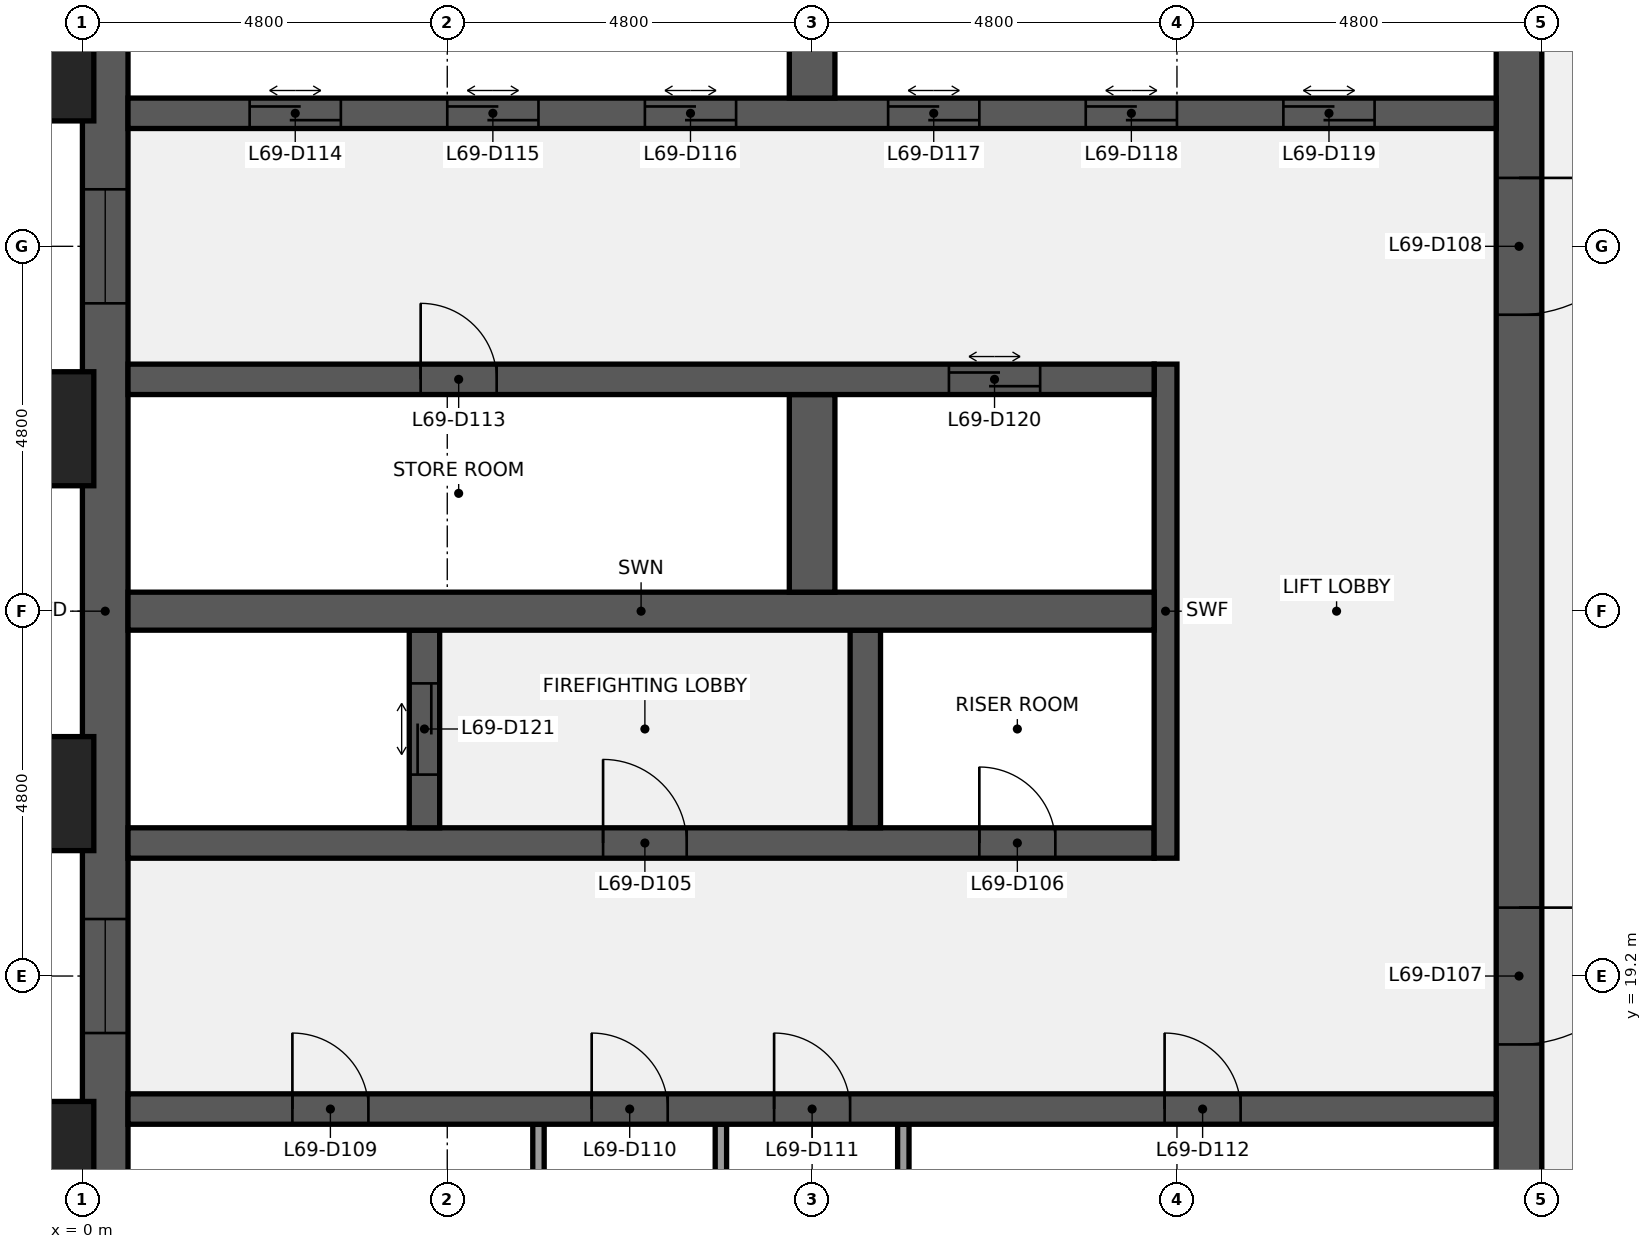
"""IFC4 building model, lengths in metres.
Left out: names, types, materials, properties, quantities, classifications, styles, units other than length and angle.
Written with IfcOpenShell. Run it as: python <this file> out.ifc"""

import sys

from ifc_helpers import new_model, si_unit, direction, frame, frame_2d, origin, origin_2d, place, context, subcontext, project, spatial, rectangle, extrude, element, fill, save


model = new_model("IFC4")
c1 = context("Model", 3, precision=1e-05, world=origin(), true_north=direction((0.0, 1.0)))
c2 = subcontext(c1, "Body", "Model", "MODEL_VIEW")
j1 = project(units=[si_unit("LENGTHUNIT", "METRE"), si_unit("PLANEANGLEUNIT", "RADIAN")], contexts=[c1])
p1 = place(None, origin())
s1 = spatial("IfcSite", under=j1, at=p1, CompositionType="ELEMENT")
p2 = place(p1, origin())
s2 = spatial("IfcBuilding", under=s1, at=p2, CompositionType="ELEMENT")
p3 = place(p2, frame((0.0, 0.0, 314.3)))
s3 = spatial("IfcBuildingStorey", under=s2, at=p3, CompositionType="ELEMENT", Elevation=314.3)
p4 = place(p3, frame((0.3, 9.6, 0.0), z_axis=(0.0, 0.0, 1.0), x_axis=(0.0, 1.0, 0.0)))
e1 = element("IfcWall", 1, at=p4, inside=s3, PredefinedType="SHEAR", context=c2, shape_type="SweptSolid", body=[
    extrude(rectangle(XDim=28.8, YDim=0.6, at=frame_2d((14.4, 0.0))), origin(), (0.0, 0.0, 1.0), 3.84),
])
p5 = place(p4, frame((8.85, 0.0, 0.9)))
e2 = element("IfcOpeningElement", 2, at=p5, cuts=e1, PredefinedType="OPENING", context=c2, shape_type="SweptSolid", body=[
    extrude(rectangle(XDim=1.5, YDim=1.5, at=frame_2d((0.75, 0.75))), frame((0.0, 0.31, 0.0), z_axis=(0.0, -1.0, 0.0), x_axis=(1.0, 0.0, 0.0)), (0.0, 0.0, 1.0), 0.62),
])
p6 = place(p4, frame((18.45, 0.0, 0.9)))
e3 = element("IfcOpeningElement", 3, at=p6, cuts=e1, PredefinedType="OPENING", context=c2, shape_type="SweptSolid", body=[
    extrude(rectangle(XDim=1.5, YDim=1.5, at=frame_2d((0.75, 0.75))), frame((0.0, 0.31, 0.0), z_axis=(0.0, -1.0, 0.0), x_axis=(1.0, 0.0, 0.0)), (0.0, 0.0, 1.0), 0.62),
])
p7 = place(p3, frame((18.9, 38.4, 0.0), z_axis=(0.0, 0.0, 1.0), x_axis=(0.0, -1.0, 0.0)))
e4 = element("IfcWall", 4, at=p7, inside=s3, PredefinedType="SHEAR", context=c2, shape_type="SweptSolid", body=[
    extrude(rectangle(XDim=28.8, YDim=0.6, at=frame_2d((14.4, 0.0))), origin(), (0.0, 0.0, 1.0), 3.84),
])
p8 = place(p7, frame((18.3, 0.0, 0.0)))
e5 = element("IfcOpeningElement", 5, at=p8, cuts=e4, PredefinedType="OPENING", context=c2, shape_type="SweptSolid", body=[
    extrude(rectangle(XDim=1.8, YDim=2.1, at=frame_2d((0.9, 1.05))), frame((0.0, 0.31, 0.0), z_axis=(0.0, -1.0, 0.0), x_axis=(1.0, 0.0, 0.0)), (0.0, 0.0, 1.0), 0.62),
])
p9 = place(p7, frame((8.7, 0.0, 0.0)))
e6 = element("IfcOpeningElement", 6, at=p9, cuts=e4, PredefinedType="OPENING", context=c2, shape_type="SweptSolid", body=[
    extrude(rectangle(XDim=1.8, YDim=2.1, at=frame_2d((0.9, 1.05))), frame((0.0, 0.31, 0.0), z_axis=(0.0, -1.0, 0.0), x_axis=(1.0, 0.0, 0.0)), (0.0, 0.0, 1.0), 0.62),
])
for number, where, z_axis, x_axis in (
    (7, (6.0, 14.65, 0.0), (0.0, 0.0, 1.0), (0.0, 1.0, 0.0)),
    (8, (8.4, 14.65, 0.0), (0.0, 0.0, 1.0), (0.0, 1.0, 0.0)),
    (9, (10.8, 14.65, 0.0), (0.0, 0.0, 1.0), (0.0, 1.0, 0.0)),
):
    element("IfcWall", number, at=place(p3, frame(where, z_axis=z_axis, x_axis=x_axis)), inside=s3, PredefinedType="PARTITIONING", context=c2, shape_type="SweptSolid", body=[
        extrude(rectangle(XDim=2.6, YDim=0.15, at=frame_2d((1.3, 0.0))), origin(), (0.0, 0.0, 1.0), 3.84),
    ])
p10 = place(p3, frame((0.6, 17.45, 0.0), z_axis=(0.0, 0.0, 1.0), x_axis=(1.0, 0.0, 0.0)))
e10 = element("IfcWall", 10, at=p10, inside=s3, PredefinedType="SHEAR", context=c2, shape_type="SweptSolid", body=[
    extrude(rectangle(XDim=18.0, YDim=0.4, at=frame_2d((9.0, 0.0))), origin(), (0.0, 0.0, 1.0), 3.84),
])
p11 = place(p10, frame((2.163, 0.0, 0.0)))
e11 = element("IfcOpeningElement", 11, at=p11, cuts=e10, PredefinedType="OPENING", context=c2, shape_type="SweptSolid", body=[
    extrude(rectangle(XDim=1.0, YDim=2.1, at=frame_2d((0.5, 1.05))), frame((0.0, 0.21, 0.0), z_axis=(0.0, -1.0, 0.0), x_axis=(1.0, 0.0, 0.0)), (0.0, 0.0, 1.0), 0.42),
])
p12 = place(p10, frame((6.1, 0.0, 0.0)))
e12 = element("IfcOpeningElement", 12, at=p12, cuts=e10, PredefinedType="OPENING", context=c2, shape_type="SweptSolid", body=[
    extrude(rectangle(XDim=1.0, YDim=2.1, at=frame_2d((0.5, 1.05))), frame((0.0, 0.21, 0.0), z_axis=(0.0, -1.0, 0.0), x_axis=(1.0, 0.0, 0.0)), (0.0, 0.0, 1.0), 0.42),
])
p13 = place(p10, frame((8.5, 0.0, 0.0)))
e13 = element("IfcOpeningElement", 13, at=p13, cuts=e10, PredefinedType="OPENING", context=c2, shape_type="SweptSolid", body=[
    extrude(rectangle(XDim=1.0, YDim=2.1, at=frame_2d((0.5, 1.05))), frame((0.0, 0.21, 0.0), z_axis=(0.0, -1.0, 0.0), x_axis=(1.0, 0.0, 0.0)), (0.0, 0.0, 1.0), 0.42),
])
p14 = place(p10, frame((13.637, 0.0, 0.0)))
e14 = element("IfcOpeningElement", 14, at=p14, cuts=e10, PredefinedType="OPENING", context=c2, shape_type="SweptSolid", body=[
    extrude(rectangle(XDim=1.0, YDim=2.1, at=frame_2d((0.5, 1.05))), frame((0.0, 0.21, 0.0), z_axis=(0.0, -1.0, 0.0), x_axis=(1.0, 0.0, 0.0)), (0.0, 0.0, 1.0), 0.42),
])
p15 = place(p3, frame((0.6, 20.95, 0.0), z_axis=(0.0, 0.0, 1.0), x_axis=(1.0, 0.0, 0.0)))
e15 = element("IfcWall", 15, at=p15, inside=s3, PredefinedType="SHEAR", context=c2, shape_type="SweptSolid", body=[
    extrude(rectangle(XDim=13.5, YDim=0.4, at=frame_2d((6.75, 0.0))), origin(), (0.0, 0.0, 1.0), 3.84),
])
p16 = place(p15, frame((6.25, 0.0, 0.0)))
e16 = element("IfcOpeningElement", 16, at=p16, cuts=e15, PredefinedType="OPENING", context=c2, shape_type="SweptSolid", body=[
    extrude(rectangle(XDim=1.1, YDim=2.1, at=frame_2d((0.55, 1.05))), frame((0.0, 0.21, 0.0), z_axis=(0.0, -1.0, 0.0), x_axis=(1.0, 0.0, 0.0)), (0.0, 0.0, 1.0), 0.42),
])
p17 = place(p15, frame((11.2, 0.0, 0.0)))
e17 = element("IfcOpeningElement", 17, at=p17, cuts=e15, PredefinedType="OPENING", context=c2, shape_type="SweptSolid", body=[
    extrude(rectangle(XDim=1.0, YDim=2.1, at=frame_2d((0.5, 1.05))), frame((0.0, 0.21, 0.0), z_axis=(0.0, -1.0, 0.0), x_axis=(1.0, 0.0, 0.0)), (0.0, 0.0, 1.0), 0.42),
])
p18 = place(p3, frame((14.25, 20.75, 0.0), z_axis=(0.0, 0.0, 1.0), x_axis=(0.0, 1.0, 0.0)))
e18 = element("IfcWall", 18, at=p18, inside=s3, PredefinedType="SHEAR", context=c2, shape_type="SweptSolid", body=[
    extrude(rectangle(XDim=6.5, YDim=0.3, at=frame_2d((3.25, 0.0))), origin(), (0.0, 0.0, 1.0), 3.84),
])
p19 = place(p3, frame((4.5, 21.15, 0.0), z_axis=(0.0, 0.0, 1.0), x_axis=(0.0, 1.0, 0.0)))
e19 = element("IfcWall", 19, at=p19, inside=s3, PredefinedType="SHEAR", context=c2, shape_type="SweptSolid", body=[
    extrude(rectangle(XDim=2.6, YDim=0.4, at=frame_2d((1.3, 0.0))), origin(), (0.0, 0.0, 1.0), 3.84),
])
p20 = place(p19, frame((0.7, 0.0, 0.0)))
e20 = element("IfcOpeningElement", 20, at=p20, cuts=e19, PredefinedType="OPENING", context=c2, shape_type="SweptSolid", body=[
    extrude(rectangle(XDim=1.2, YDim=2.1, at=frame_2d((0.6, 1.05))), frame((0.0, 0.21, 0.0), z_axis=(0.0, -1.0, 0.0), x_axis=(1.0, 0.0, 0.0)), (0.0, 0.0, 1.0), 0.42),
])
p21 = place(p3, frame((10.3, 21.15, 0.0), z_axis=(0.0, 0.0, 1.0), x_axis=(0.0, 1.0, 0.0)))
e21 = element("IfcWall", 21, at=p21, inside=s3, PredefinedType="SHEAR", context=c2, shape_type="SweptSolid", body=[
    extrude(rectangle(XDim=2.6, YDim=0.4, at=frame_2d((1.3, 0.0))), origin(), (0.0, 0.0, 1.0), 3.84),
])
p22 = place(p3, frame((0.6, 24.0, 0.0), z_axis=(0.0, 0.0, 1.0), x_axis=(1.0, 0.0, 0.0)))
e22 = element("IfcWall", 22, at=p22, inside=s3, PredefinedType="SHEAR", context=c2, shape_type="SweptSolid", body=[
    extrude(rectangle(XDim=13.5, YDim=0.5, at=frame_2d((6.75, 0.0))), origin(), (0.0, 0.0, 1.0), 3.84),
])
p23 = place(p3, frame((9.6, 24.25, 0.0), z_axis=(0.0, 0.0, 1.0), x_axis=(0.0, 1.0, 0.0)))
e23 = element("IfcWall", 23, at=p23, inside=s3, PredefinedType="SHEAR", context=c2, shape_type="SweptSolid", body=[
    extrude(rectangle(XDim=2.6, YDim=0.6, at=frame_2d((1.3, 0.0))), origin(), (0.0, 0.0, 1.0), 3.84),
])
p24 = place(p3, frame((0.6, 27.05, 0.0), z_axis=(0.0, 0.0, 1.0), x_axis=(1.0, 0.0, 0.0)))
e24 = element("IfcWall", 24, at=p24, inside=s3, PredefinedType="SHEAR", context=c2, shape_type="SweptSolid", body=[
    extrude(rectangle(XDim=13.5, YDim=0.4, at=frame_2d((6.75, 0.0))), origin(), (0.0, 0.0, 1.0), 3.84),
])
p25 = place(p24, frame((3.85, 0.0, 0.0)))
e25 = element("IfcOpeningElement", 25, at=p25, cuts=e24, PredefinedType="OPENING", context=c2, shape_type="SweptSolid", body=[
    extrude(rectangle(XDim=1.0, YDim=2.1, at=frame_2d((0.5, 1.05))), frame((0.0, 0.21, 0.0), z_axis=(0.0, -1.0, 0.0), x_axis=(1.0, 0.0, 0.0)), (0.0, 0.0, 1.0), 0.42),
])
p26 = place(p24, frame((10.8, 0.0, 0.0)))
e26 = element("IfcOpeningElement", 26, at=p26, cuts=e24, PredefinedType="OPENING", context=c2, shape_type="SweptSolid", body=[
    extrude(rectangle(XDim=1.2, YDim=2.1, at=frame_2d((0.6, 1.05))), frame((0.0, 0.21, 0.0), z_axis=(0.0, -1.0, 0.0), x_axis=(1.0, 0.0, 0.0)), (0.0, 0.0, 1.0), 0.42),
])
p27 = place(p3, frame((0.6, 30.55, 0.0), z_axis=(0.0, 0.0, 1.0), x_axis=(1.0, 0.0, 0.0)))
e27 = element("IfcWall", 27, at=p27, inside=s3, PredefinedType="SHEAR", context=c2, shape_type="SweptSolid", body=[
    extrude(rectangle(XDim=18.0, YDim=0.4, at=frame_2d((9.0, 0.0))), origin(), (0.0, 0.0, 1.0), 3.84),
])
p28 = place(p27, frame((1.6, 0.0, 0.0)))
e28 = element("IfcOpeningElement", 28, at=p28, cuts=e27, PredefinedType="OPENING", context=c2, shape_type="SweptSolid", body=[
    extrude(rectangle(XDim=1.2, YDim=2.1, at=frame_2d((0.6, 1.05))), frame((0.0, 0.21, 0.0), z_axis=(0.0, -1.0, 0.0), x_axis=(1.0, 0.0, 0.0)), (0.0, 0.0, 1.0), 0.42),
])
p29 = place(p27, frame((4.2, 0.0, 0.0)))
e29 = element("IfcOpeningElement", 29, at=p29, cuts=e27, PredefinedType="OPENING", context=c2, shape_type="SweptSolid", body=[
    extrude(rectangle(XDim=1.2, YDim=2.1, at=frame_2d((0.6, 1.05))), frame((0.0, 0.21, 0.0), z_axis=(0.0, -1.0, 0.0), x_axis=(1.0, 0.0, 0.0)), (0.0, 0.0, 1.0), 0.42),
])
p30 = place(p27, frame((6.8, 0.0, 0.0)))
e30 = element("IfcOpeningElement", 30, at=p30, cuts=e27, PredefinedType="OPENING", context=c2, shape_type="SweptSolid", body=[
    extrude(rectangle(XDim=1.2, YDim=2.1, at=frame_2d((0.6, 1.05))), frame((0.0, 0.21, 0.0), z_axis=(0.0, -1.0, 0.0), x_axis=(1.0, 0.0, 0.0)), (0.0, 0.0, 1.0), 0.42),
])
p31 = place(p27, frame((10.0, 0.0, 0.0)))
e31 = element("IfcOpeningElement", 31, at=p31, cuts=e27, PredefinedType="OPENING", context=c2, shape_type="SweptSolid", body=[
    extrude(rectangle(XDim=1.2, YDim=2.1, at=frame_2d((0.6, 1.05))), frame((0.0, 0.21, 0.0), z_axis=(0.0, -1.0, 0.0), x_axis=(1.0, 0.0, 0.0)), (0.0, 0.0, 1.0), 0.42),
])
p32 = place(p27, frame((12.6, 0.0, 0.0)))
e32 = element("IfcOpeningElement", 32, at=p32, cuts=e27, PredefinedType="OPENING", context=c2, shape_type="SweptSolid", body=[
    extrude(rectangle(XDim=1.2, YDim=2.1, at=frame_2d((0.6, 1.05))), frame((0.0, 0.21, 0.0), z_axis=(0.0, -1.0, 0.0), x_axis=(1.0, 0.0, 0.0)), (0.0, 0.0, 1.0), 0.42),
])
p33 = place(p27, frame((15.2, 0.0, 0.0)))
e33 = element("IfcOpeningElement", 33, at=p33, cuts=e27, PredefinedType="OPENING", context=c2, shape_type="SweptSolid", body=[
    extrude(rectangle(XDim=1.2, YDim=2.1, at=frame_2d((0.6, 1.05))), frame((0.0, 0.21, 0.0), z_axis=(0.0, -1.0, 0.0), x_axis=(1.0, 0.0, 0.0)), (0.0, 0.0, 1.0), 0.42),
])
p34 = place(p3, frame((9.6, 30.75, 0.0), z_axis=(0.0, 0.0, 1.0), x_axis=(0.0, 1.0, 0.0)))
e34 = element("IfcWall", 34, at=p34, inside=s3, PredefinedType="SHEAR", context=c2, shape_type="SweptSolid", body=[
    extrude(rectangle(XDim=2.6, YDim=0.6, at=frame_2d((1.3, 0.0))), origin(), (0.0, 0.0, 1.0), 3.84),
])
for number, where, z_axis, x_axis in (
    (35, (-0.75, 16.8, 0.0), (0.0, 0.0, 1.0), (0.0, 1.0, 0.0)),
    (36, (-0.75, 21.6, 0.0), (0.0, 0.0, 1.0), (0.0, 1.0, 0.0)),
    (37, (-0.75, 26.4, 0.0), (0.0, 0.0, 1.0), (0.0, 1.0, 0.0)),
    (38, (-0.75, 31.2, 0.0), (0.0, 0.0, 1.0), (0.0, 1.0, 0.0)),
):
    element("IfcColumn", number, at=place(p3, frame(where, z_axis=z_axis, x_axis=x_axis)), inside=s3, PredefinedType="PILASTER", context=c2, shape_type="SweptSolid", body=[
        extrude(rectangle(XDim=1.8, YDim=1.5, at=origin_2d()), origin(), (0.0, 0.0, 1.0), 4.0),
    ])
p35 = place(p16, origin())
e39 = element("IfcDoor", 39, at=p35, inside=s3, OperationType="SINGLE_SWING_LEFT", PredefinedType="DOOR", context=c2, shape_type="SweptSolid", body=[
    extrude(rectangle(XDim=1.1, YDim=2.1, at=frame_2d((0.55, 1.05))), frame((0.0, 0.025, 0.0), z_axis=(0.0, -1.0, 0.0), x_axis=(1.0, 0.0, 0.0)), (0.0, 0.0, 1.0), 0.05),
])
fill(e16, e39)
p36 = place(p17, origin())
e40 = element("IfcDoor", 40, at=p36, inside=s3, OperationType="SINGLE_SWING_LEFT", PredefinedType="DOOR", context=c2, shape_type="SweptSolid", body=[
    extrude(rectangle(XDim=1.0, YDim=2.1, at=frame_2d((0.5, 1.05))), frame((0.0, 0.025, 0.0), z_axis=(0.0, -1.0, 0.0), x_axis=(1.0, 0.0, 0.0)), (0.0, 0.0, 1.0), 0.05),
])
fill(e17, e40)
p37 = place(p8, origin())
e41 = element("IfcDoor", 41, at=p37, inside=s3, OperationType="DOUBLE_DOOR_SINGLE_SWING", PredefinedType="DOOR", context=c2, shape_type="SweptSolid", body=[
    extrude(rectangle(XDim=1.8, YDim=2.1, at=frame_2d((0.9, 1.05))), frame((0.0, 0.025, 0.0), z_axis=(0.0, -1.0, 0.0), x_axis=(1.0, 0.0, 0.0)), (0.0, 0.0, 1.0), 0.05),
])
fill(e5, e41)
p38 = place(p9, origin())
e42 = element("IfcDoor", 42, at=p38, inside=s3, OperationType="DOUBLE_DOOR_SINGLE_SWING", PredefinedType="DOOR", context=c2, shape_type="SweptSolid", body=[
    extrude(rectangle(XDim=1.8, YDim=2.1, at=frame_2d((0.9, 1.05))), frame((0.0, 0.025, 0.0), z_axis=(0.0, -1.0, 0.0), x_axis=(1.0, 0.0, 0.0)), (0.0, 0.0, 1.0), 0.05),
])
fill(e6, e42)
p39 = place(p11, origin())
e43 = element("IfcDoor", 43, at=p39, inside=s3, OperationType="SINGLE_SWING_LEFT", PredefinedType="DOOR", context=c2, shape_type="SweptSolid", body=[
    extrude(rectangle(XDim=1.0, YDim=2.1, at=frame_2d((0.5, 1.05))), frame((0.0, 0.025, 0.0), z_axis=(0.0, -1.0, 0.0), x_axis=(1.0, 0.0, 0.0)), (0.0, 0.0, 1.0), 0.05),
])
fill(e11, e43)
p40 = place(p12, origin())
e44 = element("IfcDoor", 44, at=p40, inside=s3, OperationType="SINGLE_SWING_LEFT", PredefinedType="DOOR", context=c2, shape_type="SweptSolid", body=[
    extrude(rectangle(XDim=1.0, YDim=2.1, at=frame_2d((0.5, 1.05))), frame((0.0, 0.025, 0.0), z_axis=(0.0, -1.0, 0.0), x_axis=(1.0, 0.0, 0.0)), (0.0, 0.0, 1.0), 0.05),
])
fill(e12, e44)
p41 = place(p13, origin())
e45 = element("IfcDoor", 45, at=p41, inside=s3, OperationType="SINGLE_SWING_LEFT", PredefinedType="DOOR", context=c2, shape_type="SweptSolid", body=[
    extrude(rectangle(XDim=1.0, YDim=2.1, at=frame_2d((0.5, 1.05))), frame((0.0, 0.025, 0.0), z_axis=(0.0, -1.0, 0.0), x_axis=(1.0, 0.0, 0.0)), (0.0, 0.0, 1.0), 0.05),
])
fill(e13, e45)
p42 = place(p14, origin())
e46 = element("IfcDoor", 46, at=p42, inside=s3, OperationType="SINGLE_SWING_LEFT", PredefinedType="DOOR", context=c2, shape_type="SweptSolid", body=[
    extrude(rectangle(XDim=1.0, YDim=2.1, at=frame_2d((0.5, 1.05))), frame((0.0, 0.025, 0.0), z_axis=(0.0, -1.0, 0.0), x_axis=(1.0, 0.0, 0.0)), (0.0, 0.0, 1.0), 0.05),
])
fill(e14, e46)
p43 = place(p25, origin())
e47 = element("IfcDoor", 47, at=p43, inside=s3, OperationType="SINGLE_SWING_LEFT", PredefinedType="DOOR", context=c2, shape_type="SweptSolid", body=[
    extrude(rectangle(XDim=1.0, YDim=2.1, at=frame_2d((0.5, 1.05))), frame((0.0, 0.025, 0.0), z_axis=(0.0, -1.0, 0.0), x_axis=(1.0, 0.0, 0.0)), (0.0, 0.0, 1.0), 0.05),
])
fill(e25, e47)
p44 = place(p28, origin())
e48 = element("IfcDoor", 48, at=p44, inside=s3, OperationType="DOUBLE_DOOR_SLIDING", PredefinedType="DOOR", context=c2, shape_type="SweptSolid", body=[
    extrude(rectangle(XDim=1.2, YDim=2.1, at=frame_2d((0.6, 1.05))), frame((0.0, 0.025, 0.0), z_axis=(0.0, -1.0, 0.0), x_axis=(1.0, 0.0, 0.0)), (0.0, 0.0, 1.0), 0.05),
])
fill(e28, e48)
p45 = place(p29, origin())
e49 = element("IfcDoor", 49, at=p45, inside=s3, OperationType="DOUBLE_DOOR_SLIDING", PredefinedType="DOOR", context=c2, shape_type="SweptSolid", body=[
    extrude(rectangle(XDim=1.2, YDim=2.1, at=frame_2d((0.6, 1.05))), frame((0.0, 0.025, 0.0), z_axis=(0.0, -1.0, 0.0), x_axis=(1.0, 0.0, 0.0)), (0.0, 0.0, 1.0), 0.05),
])
fill(e29, e49)
p46 = place(p30, origin())
e50 = element("IfcDoor", 50, at=p46, inside=s3, OperationType="DOUBLE_DOOR_SLIDING", PredefinedType="DOOR", context=c2, shape_type="SweptSolid", body=[
    extrude(rectangle(XDim=1.2, YDim=2.1, at=frame_2d((0.6, 1.05))), frame((0.0, 0.025, 0.0), z_axis=(0.0, -1.0, 0.0), x_axis=(1.0, 0.0, 0.0)), (0.0, 0.0, 1.0), 0.05),
])
fill(e30, e50)
p47 = place(p31, origin())
e51 = element("IfcDoor", 51, at=p47, inside=s3, OperationType="DOUBLE_DOOR_SLIDING", PredefinedType="DOOR", context=c2, shape_type="SweptSolid", body=[
    extrude(rectangle(XDim=1.2, YDim=2.1, at=frame_2d((0.6, 1.05))), frame((0.0, 0.025, 0.0), z_axis=(0.0, -1.0, 0.0), x_axis=(1.0, 0.0, 0.0)), (0.0, 0.0, 1.0), 0.05),
])
fill(e31, e51)
p48 = place(p32, origin())
e52 = element("IfcDoor", 52, at=p48, inside=s3, OperationType="DOUBLE_DOOR_SLIDING", PredefinedType="DOOR", context=c2, shape_type="SweptSolid", body=[
    extrude(rectangle(XDim=1.2, YDim=2.1, at=frame_2d((0.6, 1.05))), frame((0.0, 0.025, 0.0), z_axis=(0.0, -1.0, 0.0), x_axis=(1.0, 0.0, 0.0)), (0.0, 0.0, 1.0), 0.05),
])
fill(e32, e52)
p49 = place(p33, origin())
e53 = element("IfcDoor", 53, at=p49, inside=s3, OperationType="DOUBLE_DOOR_SLIDING", PredefinedType="DOOR", context=c2, shape_type="SweptSolid", body=[
    extrude(rectangle(XDim=1.2, YDim=2.1, at=frame_2d((0.6, 1.05))), frame((0.0, 0.025, 0.0), z_axis=(0.0, -1.0, 0.0), x_axis=(1.0, 0.0, 0.0)), (0.0, 0.0, 1.0), 0.05),
])
fill(e33, e53)
p50 = place(p26, origin())
e54 = element("IfcDoor", 54, at=p50, inside=s3, OperationType="DOUBLE_DOOR_SLIDING", PredefinedType="DOOR", context=c2, shape_type="SweptSolid", body=[
    extrude(rectangle(XDim=1.2, YDim=2.1, at=frame_2d((0.6, 1.05))), frame((0.0, 0.025, 0.0), z_axis=(0.0, -1.0, 0.0), x_axis=(1.0, 0.0, 0.0)), (0.0, 0.0, 1.0), 0.05),
])
fill(e26, e54)
p51 = place(p20, origin())
e55 = element("IfcDoor", 55, at=p51, inside=s3, OperationType="DOUBLE_DOOR_SLIDING", PredefinedType="DOOR", context=c2, shape_type="SweptSolid", body=[
    extrude(rectangle(XDim=1.2, YDim=2.1, at=frame_2d((0.6, 1.05))), frame((0.0, 0.025, 0.0), z_axis=(0.0, -1.0, 0.0), x_axis=(1.0, 0.0, 0.0)), (0.0, 0.0, 1.0), 0.05),
])
fill(e20, e55)
p52 = place(p5, origin())
e56 = element("IfcWindow", 56, at=p52, inside=s3, PartitioningType="SINGLE_PANEL", PredefinedType="WINDOW", context=c2, shape_type="SweptSolid", body=[
    extrude(rectangle(XDim=1.5, YDim=1.5, at=frame_2d((0.75, 0.75))), frame((0.0, 0.03, 0.0), z_axis=(0.0, -1.0, 0.0), x_axis=(1.0, 0.0, 0.0)), (0.0, 0.0, 1.0), 0.06),
])
fill(e2, e56)
p53 = place(p6, origin())
e57 = element("IfcWindow", 57, at=p53, inside=s3, PartitioningType="SINGLE_PANEL", PredefinedType="WINDOW", context=c2, shape_type="SweptSolid", body=[
    extrude(rectangle(XDim=1.5, YDim=1.5, at=frame_2d((0.75, 0.75))), frame((0.0, 0.03, 0.0), z_axis=(0.0, -1.0, 0.0), x_axis=(1.0, 0.0, 0.0)), (0.0, 0.0, 1.0), 0.06),
])
fill(e3, e57)
save(model, sys.argv[1])
